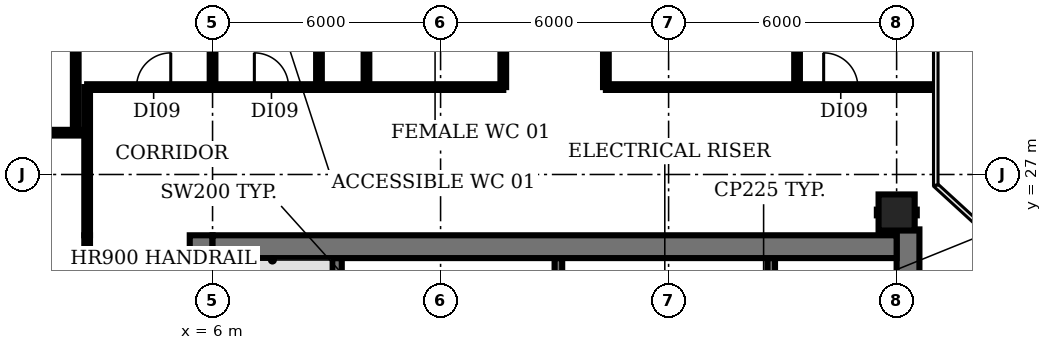
"""IFC4 building model, lengths in metres.
Left out: names, types, materials, properties, quantities, classifications, styles, units other than length and angle.
Written with IfcOpenShell. Run it as: python <this file> out.ifc"""

import sys

from ifc_helpers import new_model, si_unit, direction, frame, frame_2d, origin, origin_2d, place, context, subcontext, project, spatial, rectangle, circle, extrude, element, fill, save


model = new_model("IFC4")
c1 = context("Model", 3, precision=1e-05, world=origin(), true_north=direction((0.0, 1.0)))
c2 = subcontext(c1, "Body", "Model", "MODEL_VIEW")
j1 = project(units=[si_unit("LENGTHUNIT", "METRE"), si_unit("PLANEANGLEUNIT", "RADIAN")], contexts=[c1])
p1 = place(None, origin())
s1 = spatial("IfcSite", under=j1, at=p1, CompositionType="ELEMENT")
p2 = place(p1, origin())
s2 = spatial("IfcBuilding", under=s1, at=p2, CompositionType="ELEMENT")
p3 = place(p2, frame((0.0, 0.0, 180.2)))
s3 = spatial("IfcBuildingStorey", under=s2, at=p3, CompositionType="ELEMENT", Elevation=180.2)
p4 = place(p3, frame((24.0, 26.0, 0.0), z_axis=(0.0, 0.0, 1.0), x_axis=(1.0, 0.0, 0.0)))
e1 = element("IfcColumn", 1, at=p4, inside=s3, PredefinedType="COLUMN", context=c2, shape_type="SweptSolid", body=[
    extrude(circle(Radius=0.475, at=origin_2d()), origin(), (0.0, 0.0, 1.0), 3.85),
])
p5 = place(p3, frame((9.275, 18.375, 0.0), z_axis=(0.0, 0.0, 1.0), x_axis=(0.0, 1.0, 0.0)))
e2 = element("IfcWall", 2, at=p5, inside=s3, PredefinedType="SHEAR", context=c2, shape_type="SweptSolid", body=[
    extrude(rectangle(XDim=6.425, YDim=0.25, at=frame_2d((3.212, 0.0))), origin(), (0.0, 0.0, 1.0), 3.85),
])
for number, where, z_axis, x_axis in (
    (3, (15.1, 22.9, 0.0), (0.0, 0.0, 1.0), (0.0, 1.0, 0.0)),
    (4, (20.7, 22.9, 0.0), (0.0, 0.0, 1.0), (0.0, 1.0, 0.0)),
):
    element("IfcWall", number, at=place(p3, frame(where, z_axis=z_axis, x_axis=x_axis)), inside=s3, PredefinedType="SHEAR", context=c2, shape_type="SweptSolid", body=[
        extrude(rectangle(XDim=1.9, YDim=0.2, at=frame_2d((0.95, 0.0))), origin(), (0.0, 0.0, 1.0), 3.85),
    ])
p6 = place(p3, frame((5.7, 4.8, 0.0), z_axis=(0.0, 0.0, 1.0), x_axis=(0.0, 1.0, 0.0)))
e5 = element("IfcWall", 5, at=p6, inside=s3, PredefinedType="SHEAR", context=c2, shape_type="SweptSolid", body=[
    extrude(rectangle(XDim=20.6, YDim=0.6, at=frame_2d((10.3, 0.0))), origin(), (0.0, 0.0, 1.0), 3.85),
])
p7 = place(p6, frame((0.85, 0.0, 0.0)))
e6 = element("IfcOpeningElement", 6, at=p7, cuts=e5, PredefinedType="OPENING", context=c2, shape_type="SweptSolid", body=[
    extrude(rectangle(XDim=1.5, YDim=2.1, at=frame_2d((0.75, 1.05))), frame((0.0, 0.31, 0.0), z_axis=(0.0, -1.0, 0.0), x_axis=(1.0, 0.0, 0.0)), (0.0, 0.0, 1.0), 0.62),
])
p8 = place(p6, frame((7.3, 0.0, 0.0)))
e7 = element("IfcOpeningElement", 7, at=p8, cuts=e5, PredefinedType="OPENING", context=c2, shape_type="SweptSolid", body=[
    extrude(rectangle(XDim=1.2, YDim=2.1, at=frame_2d((0.6, 1.05))), frame((0.0, 0.31, 0.0), z_axis=(0.0, -1.0, 0.0), x_axis=(1.0, 0.0, 0.0)), (0.0, 0.0, 1.0), 0.62),
])
p9 = place(p6, frame((13.85, 0.0, 0.0)))
e8 = element("IfcOpeningElement", 8, at=p9, cuts=e5, PredefinedType="OPENING", context=c2, shape_type="SweptSolid", body=[
    extrude(rectangle(XDim=1.2, YDim=2.1, at=frame_2d((0.6, 1.05))), frame((0.0, 0.31, 0.0), z_axis=(0.0, -1.0, 0.0), x_axis=(1.0, 0.0, 0.0)), (0.0, 0.0, 1.0), 0.62),
])
p10 = place(p3, frame((24.3, 25.555, 0.0), z_axis=(0.0, 0.0, 1.0), x_axis=(0.0, -1.0, 0.0)))
e9 = element("IfcWall", 9, at=p10, inside=s3, PredefinedType="SHEAR", context=c2, shape_type="SweptSolid", body=[
    extrude(rectangle(XDim=20.755, YDim=0.6, at=frame_2d((10.377, 0.0))), origin(), (0.0, 0.0, 1.0), 3.85),
])
p11 = place(p10, frame((18.405, 0.0, 0.0)))
e10 = element("IfcOpeningElement", 10, at=p11, cuts=e9, PredefinedType="OPENING", context=c2, shape_type="SweptSolid", body=[
    extrude(rectangle(XDim=1.5, YDim=2.1, at=frame_2d((0.75, 1.05))), frame((0.0, 0.31, 0.0), z_axis=(0.0, -1.0, 0.0), x_axis=(1.0, 0.0, 0.0)), (0.0, 0.0, 1.0), 0.62),
])
p12 = place(p10, frame((12.305, 0.0, 0.0)))
e11 = element("IfcOpeningElement", 11, at=p12, cuts=e9, PredefinedType="OPENING", context=c2, shape_type="SweptSolid", body=[
    extrude(rectangle(XDim=0.9, YDim=2.1, at=frame_2d((0.45, 1.05))), frame((0.0, 0.31, 0.0), z_axis=(0.0, -1.0, 0.0), x_axis=(1.0, 0.0, 0.0)), (0.0, 0.0, 1.0), 0.62),
])
p13 = place(p10, frame((6.305, 0.0, 0.0)))
e12 = element("IfcOpeningElement", 12, at=p13, cuts=e9, PredefinedType="OPENING", context=c2, shape_type="SweptSolid", body=[
    extrude(rectangle(XDim=2.0, YDim=2.1, at=frame_2d((1.0, 1.05))), frame((0.0, 0.31, 0.0), z_axis=(0.0, -1.0, 0.0), x_axis=(1.0, 0.0, 0.0)), (0.0, 0.0, 1.0), 0.62),
])
p14 = place(p3, frame((6.0, 25.1, 0.0), z_axis=(0.0, 0.0, 1.0), x_axis=(1.0, 0.0, 0.0)))
e13 = element("IfcWall", 13, at=p14, inside=s3, PredefinedType="SHEAR", context=c2, shape_type="SweptSolid", body=[
    extrude(rectangle(XDim=18.0, YDim=0.6, at=frame_2d((9.0, 0.0))), origin(), (0.0, 0.0, 1.0), 3.85),
])
p15 = place(p3, frame((-0.97, 28.1, 0.0), z_axis=(0.0, 0.0, 1.0), x_axis=(1.0, 0.0, 0.0)))
e14 = element("IfcWall", 14, at=p15, inside=s3, PredefinedType="PARTITIONING", context=c2, shape_type="SweptSolid", body=[
    extrude(rectangle(XDim=3.67, YDim=0.15, at=frame_2d((1.835, 0.0))), origin(), (0.0, 0.0, 1.0), 2.88),
])
p16 = place(p3, frame((2.4, 28.1, 0.0), z_axis=(0.0, 0.0, 1.0), x_axis=(0.0, 1.0, 0.0)))
e15 = element("IfcWall", 15, at=p16, inside=s3, PredefinedType="PARTITIONING", context=c2, shape_type="SweptSolid", body=[
    extrude(rectangle(XDim=6.0, YDim=0.15, at=frame_2d((3.0, 0.0))), origin(), (0.0, 0.0, 1.0), 2.88),
])
p17 = place(p3, frame((2.7, 4.8, 0.0), z_axis=(0.0, 0.0, 1.0), x_axis=(0.0, 1.0, 0.0)))
e16 = element("IfcWall", 16, at=p17, inside=s3, PredefinedType="PARTITIONING", context=c2, shape_type="SweptSolid", body=[
    extrude(rectangle(XDim=20.6, YDim=0.15, at=frame_2d((10.3, 0.0))), origin(), (0.0, 0.0, 1.0), 2.88),
])
p18 = place(p17, frame((10.2, 0.0, 0.0)))
e17 = element("IfcOpeningElement", 17, at=p18, cuts=e16, PredefinedType="OPENING", context=c2, shape_type="SweptSolid", body=[
    extrude(rectangle(XDim=1.2, YDim=2.1, at=frame_2d((0.6, 1.05))), frame((0.0, 0.085, 0.0), z_axis=(0.0, -1.0, 0.0), x_axis=(1.0, 0.0, 0.0)), (0.0, 0.0, 1.0), 0.17),
])
p19 = place(p3, frame((2.7, 25.4, 0.0), z_axis=(0.0, 0.0, 1.0), x_axis=(0.0, 1.0, 0.0)))
e18 = element("IfcWall", 18, at=p19, inside=s3, PredefinedType="PARTITIONING", context=c2, shape_type="SweptSolid", body=[
    extrude(rectangle(XDim=3.9, YDim=0.15, at=frame_2d((1.95, 0.0))), origin(), (0.0, 0.0, 1.0), 2.88),
])
p20 = place(p3, frame((2.7, 29.3, 0.0), z_axis=(0.0, 0.0, 1.0), x_axis=(1.0, 0.0, 0.0)))
e19 = element("IfcWall", 19, at=p20, inside=s3, PredefinedType="PARTITIONING", context=c2, shape_type="SweptSolid", body=[
    extrude(rectangle(XDim=3.3, YDim=0.15, at=frame_2d((1.65, 0.0))), origin(), (0.0, 0.0, 1.0), 2.88),
])
p21 = place(p20, frame((1.3, 0.0, 0.0)))
e20 = element("IfcOpeningElement", 20, at=p21, cuts=e19, PredefinedType="OPENING", context=c2, shape_type="SweptSolid", body=[
    extrude(rectangle(XDim=0.9, YDim=2.1, at=frame_2d((0.45, 1.05))), frame((0.0, 0.085, 0.0), z_axis=(0.0, -1.0, 0.0), x_axis=(1.0, 0.0, 0.0)), (0.0, 0.0, 1.0), 0.17),
])
p22 = place(p3, frame((6.0, 29.3, 0.0), z_axis=(0.0, 0.0, 1.0), x_axis=(0.0, 1.0, 0.0)))
e21 = element("IfcWall", 21, at=p22, inside=s3, PredefinedType="PARTITIONING", context=c2, shape_type="SweptSolid", body=[
    extrude(rectangle(XDim=4.8, YDim=0.15, at=frame_2d((2.4, 0.0))), origin(), (0.0, 0.0, 1.0), 2.88),
])
p23 = place(p3, frame((6.0, 29.3, 0.0), z_axis=(0.0, 0.0, 1.0), x_axis=(1.0, 0.0, 0.0)))
e22 = element("IfcWall", 22, at=p23, inside=s3, PredefinedType="PARTITIONING", context=c2, shape_type="SweptSolid", body=[
    extrude(rectangle(XDim=2.8, YDim=0.15, at=frame_2d((1.4, 0.0))), origin(), (0.0, 0.0, 1.0), 2.88),
])
p24 = place(p23, frame((1.1, 0.0, 0.0)))
e23 = element("IfcOpeningElement", 23, at=p24, cuts=e22, PredefinedType="OPENING", context=c2, shape_type="SweptSolid", body=[
    extrude(rectangle(XDim=0.9, YDim=2.1, at=frame_2d((0.45, 1.05))), frame((0.0, 0.085, 0.0), z_axis=(0.0, -1.0, 0.0), x_axis=(1.0, 0.0, 0.0)), (0.0, 0.0, 1.0), 0.17),
])
p25 = place(p3, frame((8.8, 29.3, 0.0), z_axis=(0.0, 0.0, 1.0), x_axis=(0.0, 1.0, 0.0)))
e24 = element("IfcWall", 24, at=p25, inside=s3, PredefinedType="PARTITIONING", context=c2, shape_type="SweptSolid", body=[
    extrude(rectangle(XDim=4.8, YDim=0.15, at=frame_2d((2.4, 0.0))), origin(), (0.0, 0.0, 1.0), 2.88),
])
p26 = place(p3, frame((8.8, 29.3, 0.0), z_axis=(0.0, 0.0, 1.0), x_axis=(1.0, 0.0, 0.0)))
e25 = element("IfcWall", 25, at=p26, inside=s3, PredefinedType="PARTITIONING", context=c2, shape_type="SweptSolid", body=[
    extrude(rectangle(XDim=4.85, YDim=0.15, at=frame_2d((2.425, 0.0))), origin(), (0.0, 0.0, 1.0), 2.88),
])
p27 = place(p3, frame((10.05, 29.3, 0.0), z_axis=(0.0, 0.0, 1.0), x_axis=(0.0, 1.0, 0.0)))
e26 = element("IfcWall", 26, at=p27, inside=s3, PredefinedType="PARTITIONING", context=c2, shape_type="SweptSolid", body=[
    extrude(rectangle(XDim=4.8, YDim=0.15, at=frame_2d((2.4, 0.0))), origin(), (0.0, 0.0, 1.0), 2.88),
])
p28 = place(p3, frame((13.65, 29.3, 0.0), z_axis=(0.0, 0.0, 1.0), x_axis=(0.0, 1.0, 0.0)))
e27 = element("IfcWall", 27, at=p28, inside=s3, PredefinedType="PARTITIONING", context=c2, shape_type="SweptSolid", body=[
    extrude(rectangle(XDim=4.8, YDim=0.15, at=frame_2d((2.4, 0.0))), origin(), (0.0, 0.0, 1.0), 2.88),
])
p29 = place(p28, frame((1.9, 0.0, 0.0)))
e28 = element("IfcOpeningElement", 28, at=p29, cuts=e27, PredefinedType="OPENING", context=c2, shape_type="SweptSolid", body=[
    extrude(rectangle(XDim=0.9, YDim=2.1, at=frame_2d((0.45, 1.05))), frame((0.0, 0.085, 0.0), z_axis=(0.0, -1.0, 0.0), x_axis=(1.0, 0.0, 0.0)), (0.0, 0.0, 1.0), 0.17),
])
p30 = place(p3, frame((16.35, 29.3, 0.0), z_axis=(0.0, 0.0, 1.0), x_axis=(0.0, 1.0, 0.0)))
e29 = element("IfcWall", 29, at=p30, inside=s3, PredefinedType="PARTITIONING", context=c2, shape_type="SweptSolid", body=[
    extrude(rectangle(XDim=4.8, YDim=0.15, at=frame_2d((2.4, 0.0))), origin(), (0.0, 0.0, 1.0), 2.88),
])
p31 = place(p3, frame((16.35, 29.3, 0.0), z_axis=(0.0, 0.0, 1.0), x_axis=(1.0, 0.0, 0.0)))
e30 = element("IfcWall", 30, at=p31, inside=s3, PredefinedType="PARTITIONING", context=c2, shape_type="SweptSolid", body=[
    extrude(rectangle(XDim=5.03, YDim=0.15, at=frame_2d((2.515, 0.0))), origin(), (0.0, 0.0, 1.0), 2.88),
])
p32 = place(p3, frame((21.38, 29.3, 0.0), z_axis=(0.0, 0.0, 1.0), x_axis=(0.0, 1.0, 0.0)))
e31 = element("IfcWall", 31, at=p32, inside=s3, PredefinedType="PARTITIONING", context=c2, shape_type="SweptSolid", body=[
    extrude(rectangle(XDim=4.8, YDim=0.15, at=frame_2d((2.4, 0.0))), origin(), (0.0, 0.0, 1.0), 2.88),
])
p33 = place(p3, frame((21.38, 29.3, 0.0), z_axis=(0.0, 0.0, 1.0), x_axis=(1.0, 0.0, 0.0)))
e32 = element("IfcWall", 32, at=p33, inside=s3, PredefinedType="PARTITIONING", context=c2, shape_type="SweptSolid", body=[
    extrude(rectangle(XDim=3.6, YDim=0.15, at=frame_2d((1.8, 0.0))), origin(), (0.0, 0.0, 1.0), 2.88),
])
p34 = place(p33, frame((0.7, 0.0, 0.0)))
e33 = element("IfcOpeningElement", 33, at=p34, cuts=e32, PredefinedType="OPENING", context=c2, shape_type="SweptSolid", body=[
    extrude(rectangle(XDim=0.9, YDim=2.1, at=frame_2d((0.45, 1.05))), frame((0.0, 0.085, 0.0), z_axis=(0.0, -1.0, 0.0), x_axis=(1.0, 0.0, 0.0)), (0.0, 0.0, 1.0), 0.17),
])
p35 = place(p3, frame((23.48, 26.0, 0.0), z_axis=(0.0, 0.0, 1.0), x_axis=(1.0, 0.0, 0.0)))
e34 = element("IfcWall", 34, at=p35, inside=s3, PredefinedType="PARTITIONING", context=c2, shape_type="SweptSolid", body=[
    extrude(rectangle(XDim=1.05, YDim=0.15, at=frame_2d((0.525, 0.0))), origin(), (0.0, 0.0, 1.0), 2.88),
])
p36 = place(p21, origin())
e35 = element("IfcDoor", 35, at=p36, inside=s3, OperationType="SINGLE_SWING_RIGHT", PredefinedType="DOOR", context=c2, shape_type="SweptSolid", body=[
    extrude(rectangle(XDim=0.9, YDim=2.1, at=frame_2d((0.45, 1.05))), frame((0.0, 0.025, 0.0), z_axis=(0.0, -1.0, 0.0), x_axis=(1.0, 0.0, 0.0)), (0.0, 0.0, 1.0), 0.05),
])
fill(e20, e35)
p37 = place(p24, origin())
e36 = element("IfcDoor", 36, at=p37, inside=s3, OperationType="SINGLE_SWING_LEFT", PredefinedType="DOOR", context=c2, shape_type="SweptSolid", body=[
    extrude(rectangle(XDim=0.9, YDim=2.1, at=frame_2d((0.45, 1.05))), frame((0.0, 0.025, 0.0), z_axis=(0.0, -1.0, 0.0), x_axis=(1.0, 0.0, 0.0)), (0.0, 0.0, 1.0), 0.05),
])
fill(e23, e36)
p38 = place(p34, origin())
e37 = element("IfcDoor", 37, at=p38, inside=s3, OperationType="SINGLE_SWING_LEFT", PredefinedType="DOOR", context=c2, shape_type="SweptSolid", body=[
    extrude(rectangle(XDim=0.9, YDim=2.1, at=frame_2d((0.45, 1.05))), frame((0.0, 0.025, 0.0), z_axis=(0.0, -1.0, 0.0), x_axis=(1.0, 0.0, 0.0)), (0.0, 0.0, 1.0), 0.05),
])
fill(e33, e37)
save(model, sys.argv[1])
